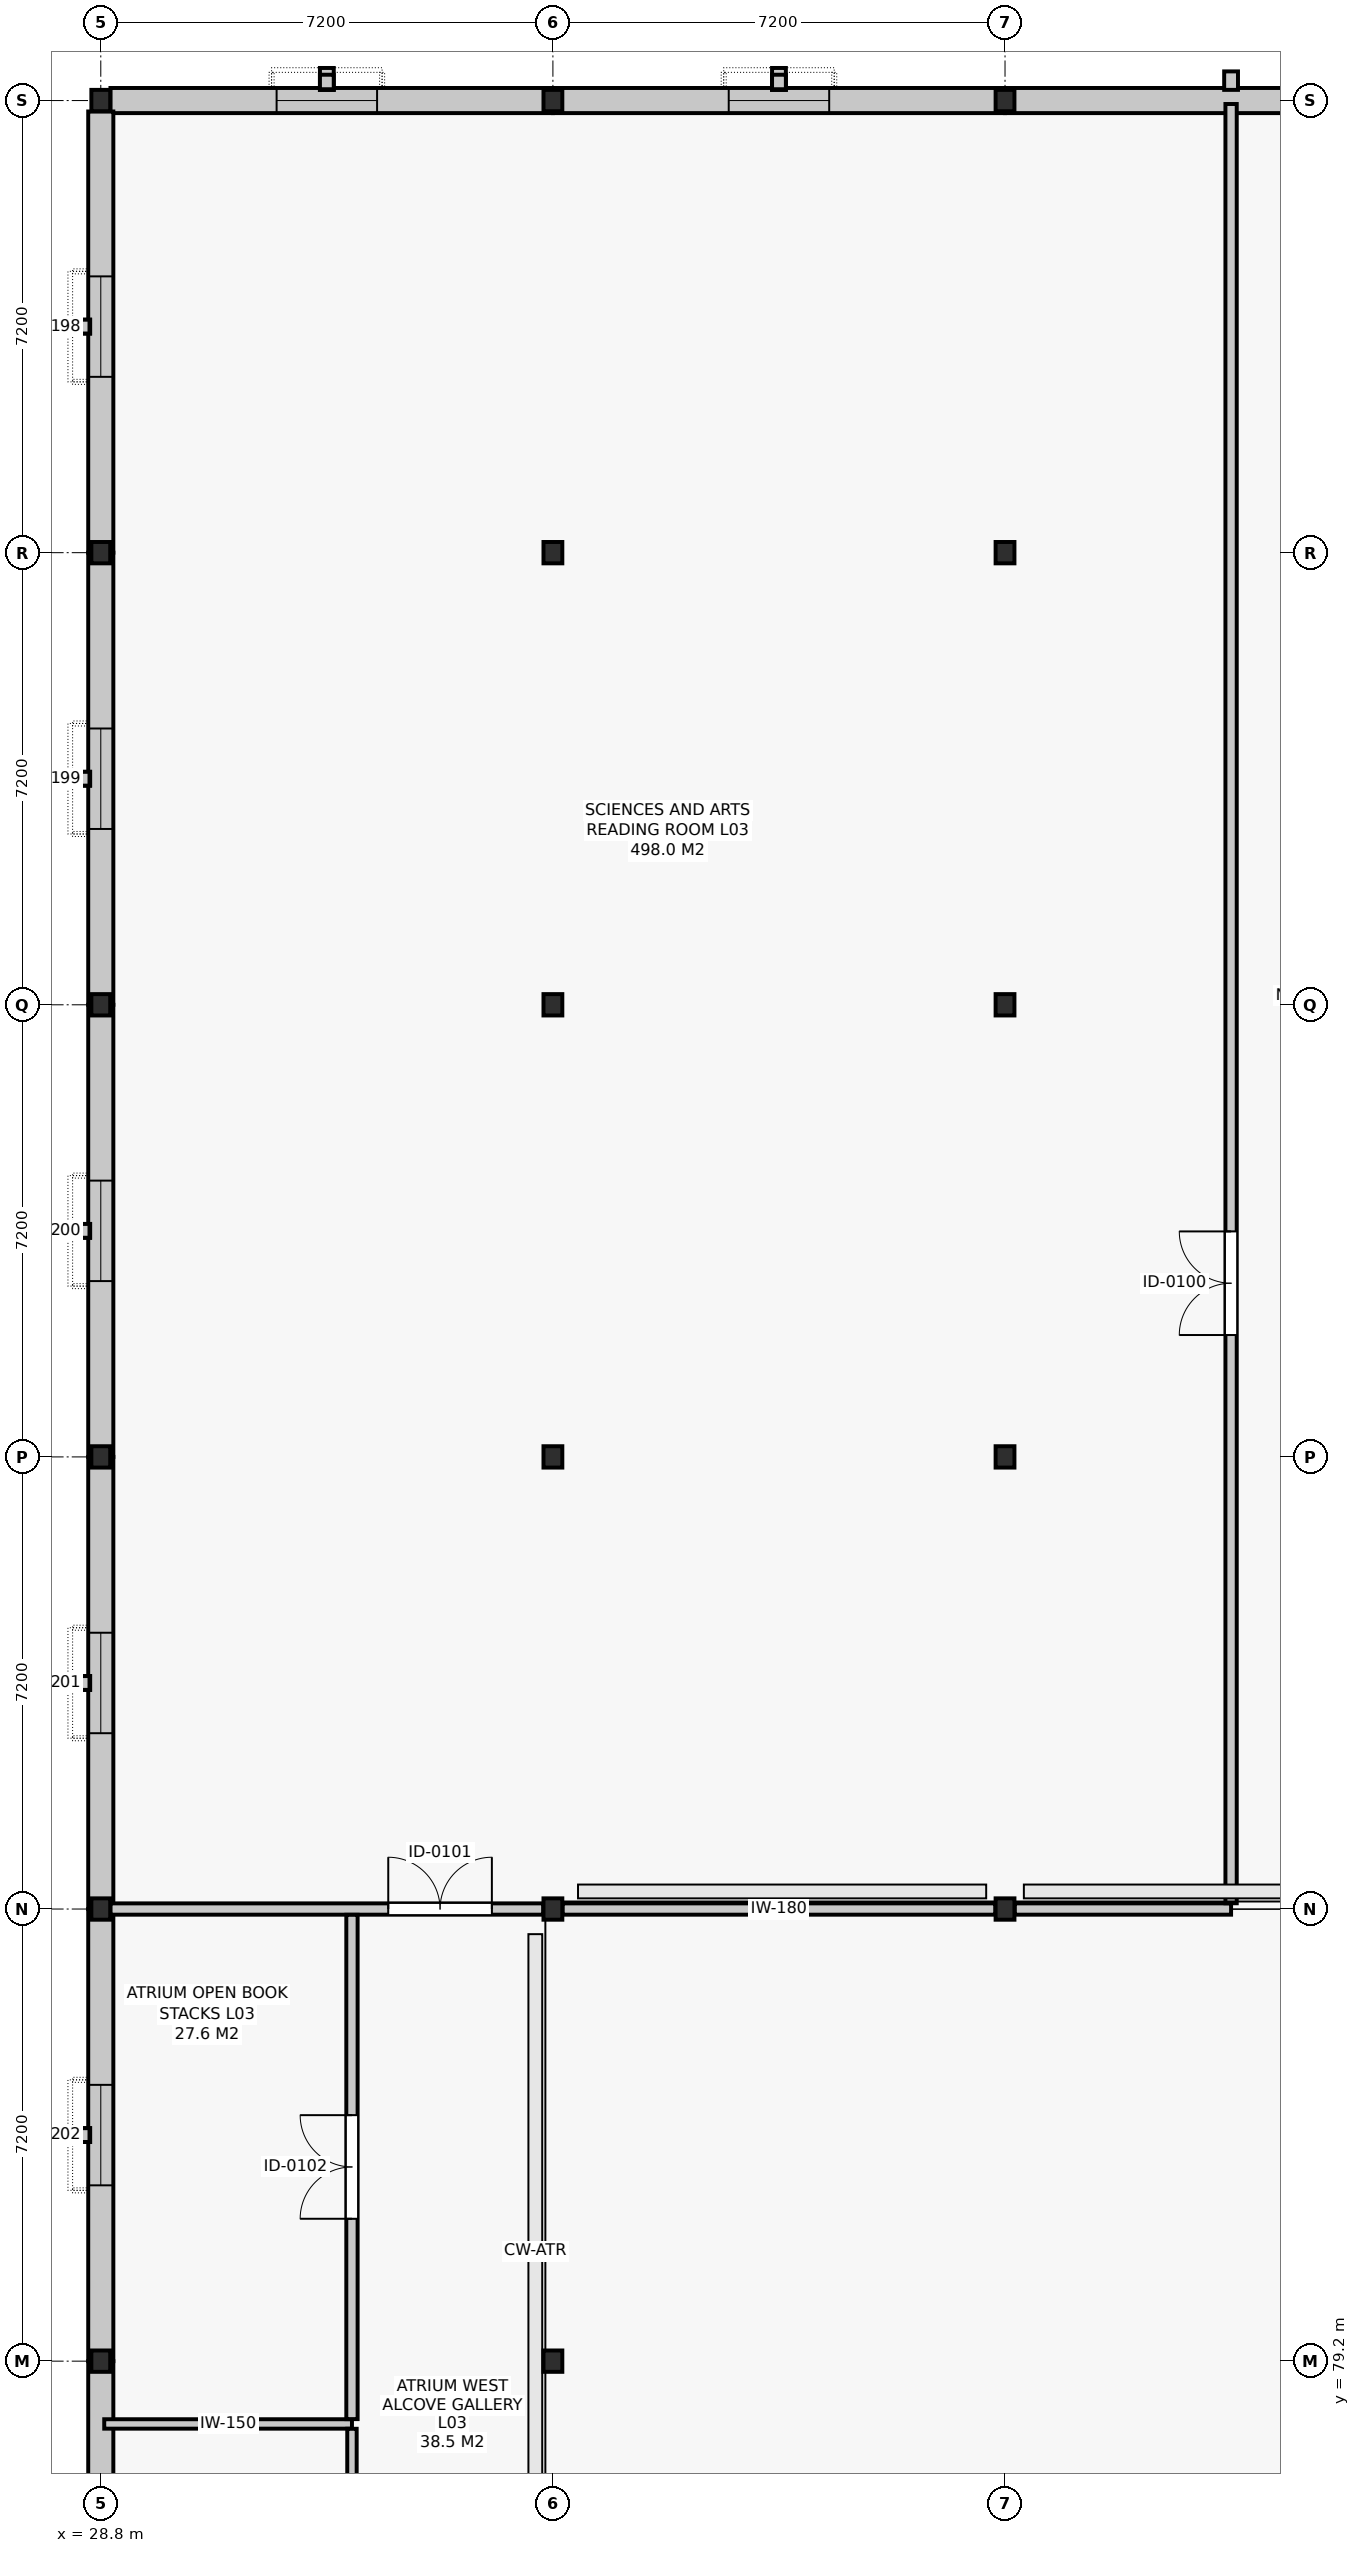
"""IFC4 building model, lengths in metres.
Left out: names, types, materials, properties, quantities, classifications, styles, units other than length and angle.
Written with IfcOpenShell. Run it as: python <this file> out.ifc"""

import sys

from ifc_helpers import new_model, si_unit, direction, frame, frame_2d, origin, origin_2d, place, context, subcontext, project, spatial, rectangle, i_section, extrude, element, fill, save


model = new_model("IFC4")
c1 = context("Model", 3, precision=1e-05, world=origin(), true_north=direction((0.0, 1.0)))
c2 = subcontext(c1, "Body", "Model", "MODEL_VIEW")
j1 = project(units=[si_unit("LENGTHUNIT", "METRE"), si_unit("PLANEANGLEUNIT", "RADIAN")], contexts=[c1])
p1 = place(None, origin())
s1 = spatial("IfcSite", under=j1, at=p1, CompositionType="ELEMENT")
p2 = place(p1, origin())
s2 = spatial("IfcBuilding", under=s1, at=p2, CompositionType="ELEMENT")
p3 = place(p2, frame((0.0, 0.0, 14.4)))
s3 = spatial("IfcBuildingStorey", under=s2, at=p3, CompositionType="ELEMENT", Elevation=14.4)
for number, where, z_axis, x_axis in (
    (1, (28.8, 79.2, 0.0), (0.0, 0.0, 1.0), (1.0, 0.0, 0.0)),
    (2, (28.8, 86.4, 0.0), (0.0, 0.0, 1.0), (1.0, 0.0, 0.0)),
    (3, (28.8, 93.6, 0.0), (0.0, 0.0, 1.0), (1.0, 0.0, 0.0)),
    (4, (28.8, 100.8, 0.0), (0.0, 0.0, 1.0), (1.0, 0.0, 0.0)),
    (5, (28.8, 108.0, 0.0), (0.0, 0.0, 1.0), (1.0, 0.0, 0.0)),
    (6, (28.8, 115.2, 0.0), (0.0, 0.0, 1.0), (1.0, 0.0, 0.0)),
    (7, (36.0, 79.2, 0.0), (0.0, 0.0, 1.0), (1.0, 0.0, 0.0)),
    (8, (36.0, 86.4, 0.0), (0.0, 0.0, 1.0), (1.0, 0.0, 0.0)),
    (9, (36.0, 93.6, 0.0), (0.0, 0.0, 1.0), (1.0, 0.0, 0.0)),
    (10, (36.0, 100.8, 0.0), (0.0, 0.0, 1.0), (1.0, 0.0, 0.0)),
    (11, (36.0, 108.0, 0.0), (0.0, 0.0, 1.0), (1.0, 0.0, 0.0)),
    (12, (36.0, 115.2, 0.0), (0.0, 0.0, 1.0), (1.0, 0.0, 0.0)),
    (13, (43.2, 86.4, 0.0), (0.0, 0.0, 1.0), (1.0, 0.0, 0.0)),
    (14, (43.2, 93.6, 0.0), (0.0, 0.0, 1.0), (1.0, 0.0, 0.0)),
    (15, (43.2, 100.8, 0.0), (0.0, 0.0, 1.0), (1.0, 0.0, 0.0)),
    (16, (43.2, 108.0, 0.0), (0.0, 0.0, 1.0), (1.0, 0.0, 0.0)),
    (17, (43.2, 115.2, 0.0), (0.0, 0.0, 1.0), (1.0, 0.0, 0.0)),
):
    element("IfcColumn", number, at=place(p3, frame(where, z_axis=z_axis, x_axis=x_axis)), inside=s3, PredefinedType="COLUMN", context=c2, shape_type="SweptSolid", body=[
        extrude(i_section(OverallWidth=0.3, OverallDepth=0.34, WebThickness=0.012, FlangeThickness=0.021, FilletRadius=0.027, at=origin_2d()), origin(), (0.0, 0.0, 1.0), 4.2),
    ])
p4 = place(p3, frame((50.4, 115.2, 0.0), z_axis=(0.0, 0.0, 1.0), x_axis=(-1.0, 0.0, 0.0)))
e18 = element("IfcWall", 18, at=p4, inside=s3, PredefinedType="SOLIDWALL", context=c2, shape_type="SweptSolid", body=[
    extrude(rectangle(XDim=7.2, YDim=0.4, at=frame_2d((3.6, 0.0))), origin(), (0.0, 0.0, 1.0), 3.22),
])
p5 = place(p3, frame((43.2, 115.2, 0.0), z_axis=(0.0, 0.0, 1.0), x_axis=(-1.0, 0.0, 0.0)))
e19 = element("IfcWall", 19, at=p5, inside=s3, PredefinedType="SOLIDWALL", context=c2, shape_type="SweptSolid", body=[
    extrude(rectangle(XDim=7.2, YDim=0.4, at=frame_2d((3.6, 0.0))), origin(), (0.0, 0.0, 1.0), 3.22),
])
p6 = place(p5, frame((2.8, 0.0, 0.95)))
e20 = element("IfcOpeningElement", 20, at=p6, cuts=e19, PredefinedType="OPENING", context=c2, shape_type="SweptSolid", body=[
    extrude(rectangle(XDim=1.6, YDim=2.2, at=frame_2d((0.8, 1.1))), frame((0.0, 0.212, 0.0), z_axis=(0.0, -1.0, 0.0), x_axis=(1.0, 0.0, 0.0)), (0.0, 0.0, 1.0), 0.424),
])
p7 = place(p3, frame((36.0, 115.2, 0.0), z_axis=(0.0, 0.0, 1.0), x_axis=(-1.0, 0.0, 0.0)))
e21 = element("IfcWall", 21, at=p7, inside=s3, PredefinedType="SOLIDWALL", context=c2, shape_type="SweptSolid", body=[
    extrude(rectangle(XDim=7.046, YDim=0.4, at=frame_2d((3.523, 0.0))), origin(), (0.0, 0.0, 1.0), 3.22),
])
p8 = place(p7, frame((2.8, 0.0, 0.95)))
e22 = element("IfcOpeningElement", 22, at=p8, cuts=e21, PredefinedType="OPENING", context=c2, shape_type="SweptSolid", body=[
    extrude(rectangle(XDim=1.6, YDim=2.2, at=frame_2d((0.8, 1.1))), frame((0.0, 0.212, 0.0), z_axis=(0.0, -1.0, 0.0), x_axis=(1.0, 0.0, 0.0)), (0.0, 0.0, 1.0), 0.424),
])
p9 = place(p3, frame((28.8, 115.026, 0.0), z_axis=(0.0, 0.0, 1.0), x_axis=(0.0, -1.0, 0.0)))
e23 = element("IfcWall", 23, at=p9, inside=s3, PredefinedType="SOLIDWALL", context=c2, shape_type="SweptSolid", body=[
    extrude(rectangle(XDim=7.026, YDim=0.4, at=frame_2d((3.513, 0.0))), origin(), (0.0, 0.0, 1.0), 3.22),
])
p10 = place(p9, frame((2.626, 0.0, 0.95)))
e24 = element("IfcOpeningElement", 24, at=p10, cuts=e23, PredefinedType="OPENING", context=c2, shape_type="SweptSolid", body=[
    extrude(rectangle(XDim=1.6, YDim=2.2, at=frame_2d((0.8, 1.1))), frame((0.0, 0.212, 0.0), z_axis=(0.0, -1.0, 0.0), x_axis=(1.0, 0.0, 0.0)), (0.0, 0.0, 1.0), 0.424),
])
p11 = place(p3, frame((28.8, 108.0, 0.0), z_axis=(0.0, 0.0, 1.0), x_axis=(0.0, -1.0, 0.0)))
e25 = element("IfcWall", 25, at=p11, inside=s3, PredefinedType="SOLIDWALL", context=c2, shape_type="SweptSolid", body=[
    extrude(rectangle(XDim=7.2, YDim=0.4, at=frame_2d((3.6, 0.0))), origin(), (0.0, 0.0, 1.0), 3.22),
])
p12 = place(p11, frame((2.8, 0.0, 0.95)))
e26 = element("IfcOpeningElement", 26, at=p12, cuts=e25, PredefinedType="OPENING", context=c2, shape_type="SweptSolid", body=[
    extrude(rectangle(XDim=1.6, YDim=2.2, at=frame_2d((0.8, 1.1))), frame((0.0, 0.212, 0.0), z_axis=(0.0, -1.0, 0.0), x_axis=(1.0, 0.0, 0.0)), (0.0, 0.0, 1.0), 0.424),
])
p13 = place(p3, frame((28.8, 100.8, 0.0), z_axis=(0.0, 0.0, 1.0), x_axis=(0.0, -1.0, 0.0)))
e27 = element("IfcWall", 27, at=p13, inside=s3, PredefinedType="SOLIDWALL", context=c2, shape_type="SweptSolid", body=[
    extrude(rectangle(XDim=7.2, YDim=0.4, at=frame_2d((3.6, 0.0))), origin(), (0.0, 0.0, 1.0), 3.22),
])
p14 = place(p13, frame((2.8, 0.0, 0.95)))
e28 = element("IfcOpeningElement", 28, at=p14, cuts=e27, PredefinedType="OPENING", context=c2, shape_type="SweptSolid", body=[
    extrude(rectangle(XDim=1.6, YDim=2.2, at=frame_2d((0.8, 1.1))), frame((0.0, 0.212, 0.0), z_axis=(0.0, -1.0, 0.0), x_axis=(1.0, 0.0, 0.0)), (0.0, 0.0, 1.0), 0.424),
])
p15 = place(p3, frame((28.8, 93.6, 0.0), z_axis=(0.0, 0.0, 1.0), x_axis=(0.0, -1.0, 0.0)))
e29 = element("IfcWall", 29, at=p15, inside=s3, PredefinedType="SOLIDWALL", context=c2, shape_type="SweptSolid", body=[
    extrude(rectangle(XDim=7.2, YDim=0.4, at=frame_2d((3.6, 0.0))), origin(), (0.0, 0.0, 1.0), 3.22),
])
p16 = place(p15, frame((2.8, 0.0, 0.95)))
e30 = element("IfcOpeningElement", 30, at=p16, cuts=e29, PredefinedType="OPENING", context=c2, shape_type="SweptSolid", body=[
    extrude(rectangle(XDim=1.6, YDim=2.2, at=frame_2d((0.8, 1.1))), frame((0.0, 0.212, 0.0), z_axis=(0.0, -1.0, 0.0), x_axis=(1.0, 0.0, 0.0)), (0.0, 0.0, 1.0), 0.424),
])
p17 = place(p3, frame((28.8, 86.4, 0.0), z_axis=(0.0, 0.0, 1.0), x_axis=(0.0, -1.0, 0.0)))
e31 = element("IfcWall", 31, at=p17, inside=s3, PredefinedType="SOLIDWALL", context=c2, shape_type="SweptSolid", body=[
    extrude(rectangle(XDim=7.2, YDim=0.4, at=frame_2d((3.6, 0.0))), origin(), (0.0, 0.0, 1.0), 3.22),
])
p18 = place(p17, frame((2.8, 0.0, 0.95)))
e32 = element("IfcOpeningElement", 32, at=p18, cuts=e31, PredefinedType="OPENING", context=c2, shape_type="SweptSolid", body=[
    extrude(rectangle(XDim=1.6, YDim=2.2, at=frame_2d((0.8, 1.1))), frame((0.0, 0.212, 0.0), z_axis=(0.0, -1.0, 0.0), x_axis=(1.0, 0.0, 0.0)), (0.0, 0.0, 1.0), 0.424),
])
p19 = place(p3, frame((28.8, 79.2, 0.0), z_axis=(0.0, 0.0, 1.0), x_axis=(0.0, -1.0, 0.0)))
e33 = element("IfcWall", 33, at=p19, inside=s3, PredefinedType="SOLIDWALL", context=c2, shape_type="SweptSolid", body=[
    extrude(rectangle(XDim=7.2, YDim=0.4, at=frame_2d((3.6, 0.0))), origin(), (0.0, 0.0, 1.0), 3.22),
])
p20 = place(p19, frame((2.8, 0.0, 0.95)))
e34 = element("IfcOpeningElement", 34, at=p20, cuts=e33, PredefinedType="OPENING", context=c2, shape_type="SweptSolid", body=[
    extrude(rectangle(XDim=1.6, YDim=2.2, at=frame_2d((0.8, 1.1))), frame((0.0, 0.212, 0.0), z_axis=(0.0, -1.0, 0.0), x_axis=(1.0, 0.0, 0.0)), (0.0, 0.0, 1.0), 0.424),
])
p21 = place(p3, frame((28.855, 78.2, 0.0), z_axis=(0.0, 0.0, 1.0), x_axis=(1.0, 0.0, 0.0)))
e35 = element("IfcWall", 35, at=p21, inside=s3, PredefinedType="PARTITIONING", context=c2, shape_type="SweptSolid", body=[
    extrude(rectangle(XDim=3.945, YDim=0.15, at=frame_2d((1.973, 0.0))), origin(), (0.0, 0.0, 1.0), 3.375),
])
p22 = place(p3, frame((28.954, 86.4, 0.0), z_axis=(0.0, 0.0, 1.0), x_axis=(1.0, 0.0, 0.0)))
e36 = element("IfcWall", 36, at=p22, inside=s3, PredefinedType="PARTITIONING", context=c2, shape_type="SweptSolid", body=[
    extrude(rectangle(XDim=6.892, YDim=0.18, at=frame_2d((3.446, 0.0))), origin(), (0.0, 0.0, 1.0), 3.615),
])
p23 = place(p22, frame((4.424, 0.0, 0.0)))
e37 = element("IfcOpeningElement", 37, at=p23, cuts=e36, PredefinedType="OPENING", context=c2, shape_type="SweptSolid", body=[
    extrude(rectangle(XDim=1.65, YDim=2.25, at=frame_2d((0.825, 1.125))), frame((0.0, 0.102, 0.0), z_axis=(0.0, -1.0, 0.0), x_axis=(1.0, 0.0, 0.0)), (0.0, 0.0, 1.0), 0.204),
])
p24 = place(p3, frame((36.154, 86.4, 0.0), z_axis=(0.0, 0.0, 1.0), x_axis=(1.0, 0.0, 0.0)))
e38 = element("IfcWall", 38, at=p24, inside=s3, PredefinedType="PARTITIONING", context=c2, shape_type="SweptSolid", body=[
    extrude(rectangle(XDim=6.892, YDim=0.18, at=frame_2d((3.446, 0.0))), origin(), (0.0, 0.0, 1.0), 3.925),
])
p25 = place(p3, frame((43.354, 86.4, 0.0), z_axis=(0.0, 0.0, 1.0), x_axis=(1.0, 0.0, 0.0)))
e39 = element("IfcWall", 39, at=p25, inside=s3, PredefinedType="PARTITIONING", context=c2, shape_type="SweptSolid", body=[
    extrude(rectangle(XDim=3.446, YDim=0.18, at=frame_2d((1.723, 0.0))), origin(), (0.0, 0.0, 1.0), 3.925),
])
p26 = place(p3, frame((32.8, 72.077, 0.0), z_axis=(0.0, 0.0, 1.0), x_axis=(0.0, 1.0, 0.0)))
e40 = element("IfcWall", 40, at=p26, inside=s3, PredefinedType="PARTITIONING", context=c2, shape_type="SweptSolid", body=[
    extrude(rectangle(XDim=6.046, YDim=0.15, at=frame_2d((3.023, 0.0))), origin(), (0.0, 0.0, 1.0), 3.615),
])
p27 = place(p26, frame((2.533, 0.0, 0.0)))
e41 = element("IfcOpeningElement", 41, at=p27, cuts=e40, PredefinedType="OPENING", context=c2, shape_type="SweptSolid", body=[
    extrude(rectangle(XDim=0.98, YDim=2.1, at=frame_2d((0.49, 1.05))), frame((0.0, 0.087, 0.0), z_axis=(0.0, -1.0, 0.0), x_axis=(1.0, 0.0, 0.0)), (0.0, 0.0, 1.0), 0.174),
])
p28 = place(p3, frame((46.8, 86.492, 0.0), z_axis=(0.0, 0.0, 1.0), x_axis=(0.0, 1.0, 0.0)))
e42 = element("IfcWall", 42, at=p28, inside=s3, PredefinedType="PARTITIONING", context=c2, shape_type="SweptSolid", body=[
    extrude(rectangle(XDim=28.653, YDim=0.18, at=frame_2d((14.327, 0.0))), origin(), (0.0, 0.0, 1.0), 3.295),
])
p29 = place(p28, frame((9.049, 0.0, 0.0)))
e43 = element("IfcOpeningElement", 43, at=p29, cuts=e42, PredefinedType="OPENING", context=c2, shape_type="SweptSolid", body=[
    extrude(rectangle(XDim=1.65, YDim=2.25, at=frame_2d((0.825, 1.125))), frame((0.0, 0.102, 0.0), z_axis=(0.0, -1.0, 0.0), x_axis=(1.0, 0.0, 0.0)), (0.0, 0.0, 1.0), 0.204),
])
p30 = place(p3, frame((32.8, 78.277, 0.0), z_axis=(0.0, 0.0, 1.0), x_axis=(0.0, 1.0, 0.0)))
e44 = element("IfcWall", 44, at=p30, inside=s3, PredefinedType="PARTITIONING", context=c2, shape_type="SweptSolid", body=[
    extrude(rectangle(XDim=8.031, YDim=0.18, at=frame_2d((4.016, 0.0))), origin(), (0.0, 0.0, 1.0), 3.615),
])
p31 = place(p30, frame((3.19, 0.0, 0.0)))
e45 = element("IfcOpeningElement", 45, at=p31, cuts=e44, PredefinedType="OPENING", context=c2, shape_type="SweptSolid", body=[
    extrude(rectangle(XDim=1.65, YDim=2.25, at=frame_2d((0.825, 1.125))), frame((0.0, 0.102, 0.0), z_axis=(0.0, -1.0, 0.0), x_axis=(1.0, 0.0, 0.0)), (0.0, 0.0, 1.0), 0.204),
])
p32 = place(p6, origin())
e46 = element("IfcWindow", 46, at=p32, inside=s3, PartitioningType="SINGLE_PANEL", PredefinedType="WINDOW", context=c2, shape_type="SweptSolid", body=[
    extrude(rectangle(XDim=1.6, YDim=2.2, at=frame_2d((0.8, 1.1))), frame((0.0, 0.03, 0.0), z_axis=(0.0, -1.0, 0.0), x_axis=(1.0, 0.0, 0.0)), (0.0, 0.0, 1.0), 0.06),
])
fill(e20, e46)
p33 = place(p8, origin())
e47 = element("IfcWindow", 47, at=p33, inside=s3, PartitioningType="SINGLE_PANEL", PredefinedType="WINDOW", context=c2, shape_type="SweptSolid", body=[
    extrude(rectangle(XDim=1.6, YDim=2.2, at=frame_2d((0.8, 1.1))), frame((0.0, 0.03, 0.0), z_axis=(0.0, -1.0, 0.0), x_axis=(1.0, 0.0, 0.0)), (0.0, 0.0, 1.0), 0.06),
])
fill(e22, e47)
p34 = place(p10, origin())
e48 = element("IfcWindow", 48, at=p34, inside=s3, PartitioningType="SINGLE_PANEL", PredefinedType="WINDOW", context=c2, shape_type="SweptSolid", body=[
    extrude(rectangle(XDim=1.6, YDim=2.2, at=frame_2d((0.8, 1.1))), frame((0.0, 0.03, 0.0), z_axis=(0.0, -1.0, 0.0), x_axis=(1.0, 0.0, 0.0)), (0.0, 0.0, 1.0), 0.06),
])
fill(e24, e48)
p35 = place(p12, origin())
e49 = element("IfcWindow", 49, at=p35, inside=s3, PartitioningType="SINGLE_PANEL", PredefinedType="WINDOW", context=c2, shape_type="SweptSolid", body=[
    extrude(rectangle(XDim=1.6, YDim=2.2, at=frame_2d((0.8, 1.1))), frame((0.0, 0.03, 0.0), z_axis=(0.0, -1.0, 0.0), x_axis=(1.0, 0.0, 0.0)), (0.0, 0.0, 1.0), 0.06),
])
fill(e26, e49)
p36 = place(p14, origin())
e50 = element("IfcWindow", 50, at=p36, inside=s3, PartitioningType="SINGLE_PANEL", PredefinedType="WINDOW", context=c2, shape_type="SweptSolid", body=[
    extrude(rectangle(XDim=1.6, YDim=2.2, at=frame_2d((0.8, 1.1))), frame((0.0, 0.03, 0.0), z_axis=(0.0, -1.0, 0.0), x_axis=(1.0, 0.0, 0.0)), (0.0, 0.0, 1.0), 0.06),
])
fill(e28, e50)
p37 = place(p16, origin())
e51 = element("IfcWindow", 51, at=p37, inside=s3, PartitioningType="SINGLE_PANEL", PredefinedType="WINDOW", context=c2, shape_type="SweptSolid", body=[
    extrude(rectangle(XDim=1.6, YDim=2.2, at=frame_2d((0.8, 1.1))), frame((0.0, 0.03, 0.0), z_axis=(0.0, -1.0, 0.0), x_axis=(1.0, 0.0, 0.0)), (0.0, 0.0, 1.0), 0.06),
])
fill(e30, e51)
p38 = place(p18, origin())
e52 = element("IfcWindow", 52, at=p38, inside=s3, PartitioningType="SINGLE_PANEL", PredefinedType="WINDOW", context=c2, shape_type="SweptSolid", body=[
    extrude(rectangle(XDim=1.6, YDim=2.2, at=frame_2d((0.8, 1.1))), frame((0.0, 0.03, 0.0), z_axis=(0.0, -1.0, 0.0), x_axis=(1.0, 0.0, 0.0)), (0.0, 0.0, 1.0), 0.06),
])
fill(e32, e52)
p39 = place(p29, origin())
e53 = element("IfcDoor", 53, at=p39, inside=s3, OperationType="DOUBLE_DOOR_SINGLE_SWING", PredefinedType="DOOR", context=c2, shape_type="SweptSolid", body=[
    extrude(rectangle(XDim=1.65, YDim=2.25, at=frame_2d((0.825, 1.125))), frame((0.0, 0.025, 0.0), z_axis=(0.0, -1.0, 0.0), x_axis=(1.0, 0.0, 0.0)), (0.0, 0.0, 1.0), 0.05),
])
fill(e43, e53)
p40 = place(p23, origin())
e54 = element("IfcDoor", 54, at=p40, inside=s3, OperationType="DOUBLE_DOOR_SINGLE_SWING", PredefinedType="DOOR", context=c2, shape_type="SweptSolid", body=[
    extrude(rectangle(XDim=1.65, YDim=2.25, at=frame_2d((0.825, 1.125))), frame((0.0, 0.025, 0.0), z_axis=(0.0, -1.0, 0.0), x_axis=(1.0, 0.0, 0.0)), (0.0, 0.0, 1.0), 0.05),
])
fill(e37, e54)
p41 = place(p31, origin())
e55 = element("IfcDoor", 55, at=p41, inside=s3, OperationType="DOUBLE_DOOR_SINGLE_SWING", PredefinedType="DOOR", context=c2, shape_type="SweptSolid", body=[
    extrude(rectangle(XDim=1.65, YDim=2.25, at=frame_2d((0.825, 1.125))), frame((0.0, 0.025, 0.0), z_axis=(0.0, -1.0, 0.0), x_axis=(1.0, 0.0, 0.0)), (0.0, 0.0, 1.0), 0.05),
])
fill(e45, e55)
save(model, sys.argv[1])
